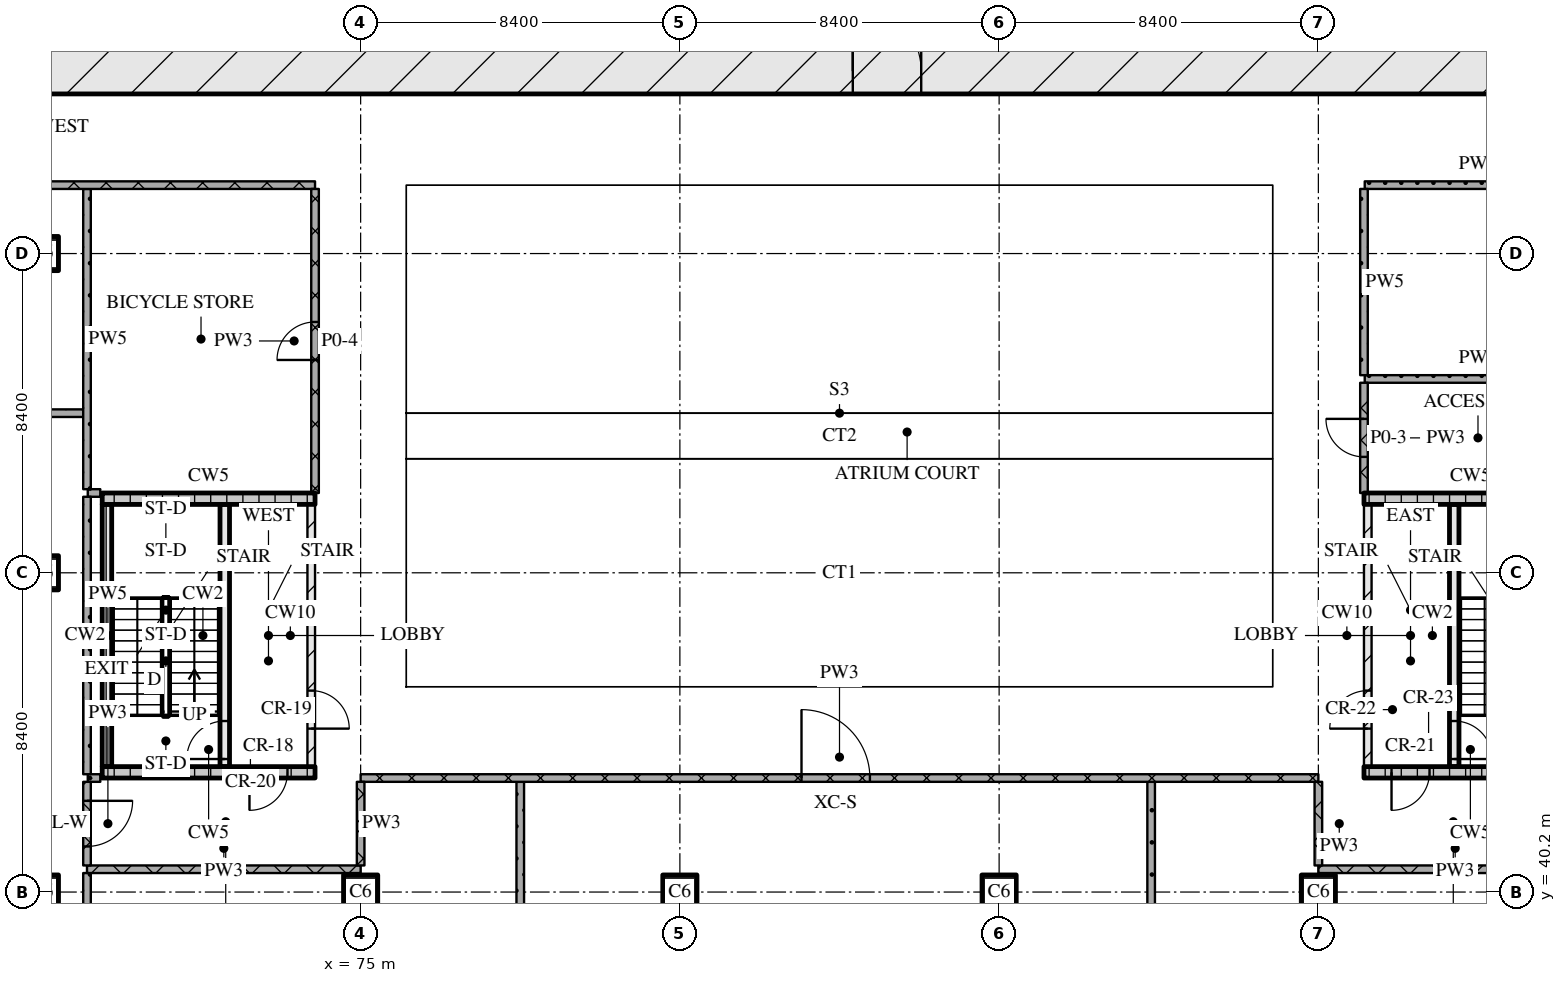
"""IFC4 building model, lengths in metres.
Left out: names, types, materials, properties, quantities, classifications, styles, units other than length and angle.
Written with IfcOpenShell. Run it as: python <this file> out.ifc"""

import sys

from ifc_helpers import new_model, si_unit, direction, frame, frame_2d, origin, origin_2d, place, context, subcontext, project, spatial, rectangle, extrude, element, fill, save


model = new_model("IFC4")
c1 = context("Model", 3, precision=1e-05, world=origin(), true_north=direction((0.0, 1.0)))
c2 = subcontext(c1, "Body", "Model", "MODEL_VIEW")
j1 = project(units=[si_unit("LENGTHUNIT", "METRE"), si_unit("PLANEANGLEUNIT", "RADIAN")], contexts=[c1])
p1 = place(None, origin())
s1 = spatial("IfcSite", under=j1, at=p1, CompositionType="ELEMENT")
p2 = place(p1, origin())
s2 = spatial("IfcBuilding", under=s1, at=p2, CompositionType="ELEMENT")
p3 = place(p2, origin())
s3 = spatial("IfcBuildingStorey", under=s2, at=p3, CompositionType="ELEMENT", Elevation=0.0)
for number, where, z_axis, x_axis in (
    (1, (66.6, 40.2, 0.0), (0.0, 0.0, 1.0), (1.0, 0.0, 0.0)),
    (2, (66.6, 48.6, 0.0), (0.0, 0.0, 1.0), (1.0, 0.0, 0.0)),
    (3, (66.6, 57.0, 0.0), (0.0, 0.0, 1.0), (1.0, 0.0, 0.0)),
    (4, (75.0, 40.2, 0.0), (0.0, 0.0, 1.0), (1.0, 0.0, 0.0)),
    (5, (83.4, 40.2, 0.0), (0.0, 0.0, 1.0), (1.0, 0.0, 0.0)),
    (6, (91.8, 40.2, 0.0), (0.0, 0.0, 1.0), (1.0, 0.0, 0.0)),
    (7, (100.2, 40.2, 0.0), (0.0, 0.0, 1.0), (1.0, 0.0, 0.0)),
):
    element("IfcColumn", number, at=place(p3, frame(where, z_axis=z_axis, x_axis=x_axis)), inside=s3, PredefinedType="COLUMN", context=c2, shape_type="SweptSolid", body=[
        extrude(rectangle(XDim=0.9, YDim=0.9, at=origin_2d()), origin(), (0.0, 0.0, 1.0), 9.0),
    ])
p4 = place(p3, frame((66.6, 61.8, 0.0), z_axis=(0.0, 0.0, 1.0), x_axis=(1.0, 0.0, 0.0)))
e8 = element("IfcWall", 8, at=p4, inside=s3, PredefinedType="SOLIDWALL", context=c2, shape_type="SweptSolid", body=[
    extrude(rectangle(XDim=42.0, YDim=1.2, at=frame_2d((21.0, 0.0))), origin(), (0.0, 0.0, 1.0), 8.7),
])
p5 = place(p4, frame((21.35, 0.0, 0.0)))
e9 = element("IfcOpeningElement", 9, at=p5, cuts=e8, PredefinedType="OPENING", context=c2, shape_type="SweptSolid", body=[
    extrude(rectangle(XDim=1.8, YDim=2.1, at=frame_2d((0.9, 1.05))), frame((0.0, 0.61, 0.0), z_axis=(0.0, -1.0, 0.0), x_axis=(1.0, 0.0, 0.0)), (0.0, 0.0, 1.0), 1.22),
])
p6 = place(p3, frame((68.2, 43.35, 0.0), z_axis=(0.0, 0.0, 1.0), x_axis=(1.0, 0.0, 0.0)))
e10 = element("IfcWall", 10, at=p6, inside=s3, PredefinedType="SOLIDWALL", context=c2, shape_type="SweptSolid", body=[
    extrude(rectangle(XDim=5.6, YDim=0.3, at=frame_2d((2.8, 0.0))), origin(), (0.0, 0.0, 1.0), 8.7),
])
p7 = place(p6, frame((3.875, 0.0, 0.0)))
e11 = element("IfcOpeningElement", 11, at=p7, cuts=e10, PredefinedType="OPENING", context=c2, shape_type="SweptSolid", body=[
    extrude(rectangle(XDim=1.0, YDim=2.1, at=frame_2d((0.5, 1.05))), frame((0.0, 0.16, 0.0), z_axis=(0.0, -1.0, 0.0), x_axis=(1.0, 0.0, 0.0)), (0.0, 0.0, 1.0), 0.32),
])
p8 = place(p3, frame((68.325, 43.5, 0.0), z_axis=(0.0, 0.0, 1.0), x_axis=(0.0, 1.0, 0.0)))
e12 = element("IfcWall", 12, at=p8, inside=s3, PredefinedType="SOLIDWALL", context=c2, shape_type="SweptSolid", body=[
    extrude(rectangle(XDim=6.9, YDim=0.25, at=frame_2d((3.45, 0.0))), origin(), (0.0, 0.0, 1.0), 8.7),
])
p9 = place(p3, frame((71.425, 43.5, 0.0), z_axis=(0.0, 0.0, 1.0), x_axis=(0.0, 1.0, 0.0)))
e13 = element("IfcWall", 13, at=p9, inside=s3, PredefinedType="SOLIDWALL", context=c2, shape_type="SweptSolid", body=[
    extrude(rectangle(XDim=6.9, YDim=0.25, at=frame_2d((3.45, 0.0))), origin(), (0.0, 0.0, 1.0), 8.7),
])
p10 = place(p9, frame((0.2, 0.0, 0.0)))
e14 = element("IfcOpeningElement", 14, at=p10, cuts=e13, PredefinedType="OPENING", context=c2, shape_type="SweptSolid", body=[
    extrude(rectangle(XDim=1.0, YDim=2.1, at=frame_2d((0.5, 1.05))), frame((0.0, 0.135, 0.0), z_axis=(0.0, -1.0, 0.0), x_axis=(1.0, 0.0, 0.0)), (0.0, 0.0, 1.0), 0.27),
])
p11 = place(p3, frame((73.7, 43.5, 0.0), z_axis=(0.0, 0.0, 1.0), x_axis=(0.0, 1.0, 0.0)))
e15 = element("IfcWall", 15, at=p11, inside=s3, PredefinedType="PARTITIONING", context=c2, shape_type="SweptSolid", body=[
    extrude(rectangle(XDim=6.9, YDim=0.2, at=frame_2d((3.45, 0.0))), origin(), (0.0, 0.0, 1.0), 8.7),
])
p12 = place(p11, frame((1.0, 0.0, 0.0)))
e16 = element("IfcOpeningElement", 16, at=p12, cuts=e15, PredefinedType="OPENING", context=c2, shape_type="SweptSolid", body=[
    extrude(rectangle(XDim=1.0, YDim=2.1, at=frame_2d((0.5, 1.05))), frame((0.0, 0.11, 0.0), z_axis=(0.0, -1.0, 0.0), x_axis=(1.0, 0.0, 0.0)), (0.0, 0.0, 1.0), 0.22),
])
p13 = place(p3, frame((68.2, 50.55, 0.0), z_axis=(0.0, 0.0, 1.0), x_axis=(1.0, 0.0, 0.0)))
e17 = element("IfcWall", 17, at=p13, inside=s3, PredefinedType="SOLIDWALL", context=c2, shape_type="SweptSolid", body=[
    extrude(rectangle(XDim=5.6, YDim=0.3, at=frame_2d((2.8, 0.0))), origin(), (0.0, 0.0, 1.0), 8.7),
])
p14 = place(p3, frame((101.4, 43.35, 0.0), z_axis=(0.0, 0.0, 1.0), x_axis=(1.0, 0.0, 0.0)))
e18 = element("IfcWall", 18, at=p14, inside=s3, PredefinedType="SOLIDWALL", context=c2, shape_type="SweptSolid", body=[
    extrude(rectangle(XDim=5.6, YDim=0.3, at=frame_2d((2.8, 0.0))), origin(), (0.0, 0.0, 1.0), 8.7),
])
p15 = place(p14, frame((0.725, 0.0, 0.0)))
e19 = element("IfcOpeningElement", 19, at=p15, cuts=e18, PredefinedType="OPENING", context=c2, shape_type="SweptSolid", body=[
    extrude(rectangle(XDim=1.0, YDim=2.1, at=frame_2d((0.5, 1.05))), frame((0.0, 0.16, 0.0), z_axis=(0.0, -1.0, 0.0), x_axis=(1.0, 0.0, 0.0)), (0.0, 0.0, 1.0), 0.32),
])
p16 = place(p3, frame((101.5, 43.5, 0.0), z_axis=(0.0, 0.0, 1.0), x_axis=(0.0, 1.0, 0.0)))
e20 = element("IfcWall", 20, at=p16, inside=s3, PredefinedType="PARTITIONING", context=c2, shape_type="SweptSolid", body=[
    extrude(rectangle(XDim=6.9, YDim=0.2, at=frame_2d((3.45, 0.0))), origin(), (0.0, 0.0, 1.0), 8.7),
])
p17 = place(p16, frame((1.0, 0.0, 0.0)))
e21 = element("IfcOpeningElement", 21, at=p17, cuts=e20, PredefinedType="OPENING", context=c2, shape_type="SweptSolid", body=[
    extrude(rectangle(XDim=1.0, YDim=2.1, at=frame_2d((0.5, 1.05))), frame((0.0, 0.11, 0.0), z_axis=(0.0, -1.0, 0.0), x_axis=(1.0, 0.0, 0.0)), (0.0, 0.0, 1.0), 0.22),
])
p18 = place(p3, frame((103.775, 43.5, 0.0), z_axis=(0.0, 0.0, 1.0), x_axis=(0.0, 1.0, 0.0)))
e22 = element("IfcWall", 22, at=p18, inside=s3, PredefinedType="SOLIDWALL", context=c2, shape_type="SweptSolid", body=[
    extrude(rectangle(XDim=6.9, YDim=0.25, at=frame_2d((3.45, 0.0))), origin(), (0.0, 0.0, 1.0), 8.7),
])
p19 = place(p18, frame((0.2, 0.0, 0.0)))
e23 = element("IfcOpeningElement", 23, at=p19, cuts=e22, PredefinedType="OPENING", context=c2, shape_type="SweptSolid", body=[
    extrude(rectangle(XDim=1.0, YDim=2.1, at=frame_2d((0.5, 1.05))), frame((0.0, 0.135, 0.0), z_axis=(0.0, -1.0, 0.0), x_axis=(1.0, 0.0, 0.0)), (0.0, 0.0, 1.0), 0.27),
])
p20 = place(p3, frame((101.4, 50.55, 0.0), z_axis=(0.0, 0.0, 1.0), x_axis=(1.0, 0.0, 0.0)))
e24 = element("IfcWall", 24, at=p20, inside=s3, PredefinedType="SOLIDWALL", context=c2, shape_type="SweptSolid", body=[
    extrude(rectangle(XDim=5.6, YDim=0.3, at=frame_2d((2.8, 0.0))), origin(), (0.0, 0.0, 1.0), 8.7),
])
for number, where, z_axis, x_axis in (
    (25, (67.8, 40.8, 0.0), (0.0, 0.0, 1.0), (1.0, 0.0, 0.0)),
    (26, (100.2, 40.8, 0.0), (0.0, 0.0, 1.0), (1.0, 0.0, 0.0)),
):
    element("IfcWall", number, at=place(p3, frame(where, z_axis=z_axis, x_axis=x_axis)), inside=s3, PredefinedType="PARTITIONING", context=c2, shape_type="SweptSolid", body=[
        extrude(rectangle(XDim=7.2, YDim=0.2, at=frame_2d((3.6, 0.0))), origin(), (0.0, 0.0, 1.0), 8.7),
    ])
p21 = place(p3, frame((75.0, 43.2, 0.0), z_axis=(0.0, 0.0, 1.0), x_axis=(1.0, 0.0, 0.0)))
e27 = element("IfcWall", 27, at=p21, inside=s3, PredefinedType="PARTITIONING", context=c2, shape_type="SweptSolid", body=[
    extrude(rectangle(XDim=25.2, YDim=0.2, at=frame_2d((12.6, 0.0))), origin(), (0.0, 0.0, 1.0), 8.7),
])
p22 = place(p21, frame((11.6, 0.0, 0.0)))
e28 = element("IfcOpeningElement", 28, at=p22, cuts=e27, PredefinedType="OPENING", context=c2, shape_type="SweptSolid", body=[
    extrude(rectangle(XDim=1.8, YDim=2.1, at=frame_2d((0.9, 1.05))), frame((0.0, 0.11, 0.0), z_axis=(0.0, -1.0, 0.0), x_axis=(1.0, 0.0, 0.0)), (0.0, 0.0, 1.0), 0.22),
])
for number, where, z_axis, x_axis in (
    (29, (67.82, 43.2, 0.0), (0.0, 0.0, 1.0), (1.0, 0.0, 0.0)),
    (30, (67.82, 50.7, 0.0), (0.0, 0.0, 1.0), (1.0, 0.0, 0.0)),
):
    element("IfcWall", number, at=place(p3, frame(where, z_axis=z_axis, x_axis=x_axis)), inside=s3, PredefinedType="PARTITIONING", context=c2, shape_type="SweptSolid", body=[
        extrude(rectangle(XDim=0.33, YDim=0.2, at=frame_2d((0.165, 0.0))), origin(), (0.0, 0.0, 1.0), 8.7),
    ])
p23 = place(p3, frame((45.5, 52.8, 0.0), z_axis=(0.0, 0.0, 1.0), x_axis=(1.0, 0.0, 0.0)))
e31 = element("IfcWall", 31, at=p23, inside=s3, PredefinedType="PARTITIONING", context=c2, shape_type="SweptSolid", body=[
    extrude(rectangle(XDim=22.2, YDim=0.2, at=frame_2d((11.1, 0.0))), origin(), (0.0, 0.0, 1.0), 8.7),
])
p24 = place(p3, frame((101.42, 53.7, 0.0), z_axis=(0.0, 0.0, 1.0), x_axis=(1.0, 0.0, 0.0)))
e32 = element("IfcWall", 32, at=p24, inside=s3, PredefinedType="PARTITIONING", context=c2, shape_type="SweptSolid", body=[
    extrude(rectangle(XDim=5.96, YDim=0.2, at=frame_2d((2.98, 0.0))), origin(), (0.0, 0.0, 1.0), 8.7),
])
p25 = place(p3, frame((73.8, 58.8, 0.0), z_axis=(0.0, 0.0, 1.0), x_axis=(-1.0, 0.0, 0.0)))
e33 = element("IfcWall", 33, at=p25, inside=s3, PredefinedType="PARTITIONING", context=c2, shape_type="SweptSolid", body=[
    extrude(rectangle(XDim=28.4, YDim=0.2, at=frame_2d((14.2, 0.0))), origin(), (0.0, 0.0, 1.0), 8.7),
])
p26 = place(p25, frame((16.6, 0.0, 0.0)))
e34 = element("IfcOpeningElement", 34, at=p26, cuts=e33, PredefinedType="OPENING", context=c2, shape_type="SweptSolid", body=[
    extrude(rectangle(XDim=1.2, YDim=2.1, at=frame_2d((0.6, 1.05))), frame((0.0, 0.11, 0.0), z_axis=(0.0, -1.0, 0.0), x_axis=(1.0, 0.0, 0.0)), (0.0, 0.0, 1.0), 0.22),
])
p27 = place(p3, frame((101.42, 58.8, 0.0), z_axis=(0.0, 0.0, 1.0), x_axis=(1.0, 0.0, 0.0)))
e35 = element("IfcWall", 35, at=p27, inside=s3, PredefinedType="PARTITIONING", context=c2, shape_type="SweptSolid", body=[
    extrude(rectangle(XDim=5.96, YDim=0.2, at=frame_2d((2.98, 0.0))), origin(), (0.0, 0.0, 1.0), 8.7),
])
p28 = place(p3, frame((67.8, 43.1, 0.0), z_axis=(0.0, 0.0, 1.0), x_axis=(0.0, -1.0, 0.0)))
e36 = element("IfcWall", 36, at=p28, inside=s3, PredefinedType="PARTITIONING", context=c2, shape_type="SweptSolid", body=[
    extrude(rectangle(XDim=2.2, YDim=0.2, at=frame_2d((1.1, 0.0))), origin(), (0.0, 0.0, 1.0), 8.7),
])
p29 = place(p28, frame((0.5, 0.0, 0.0)))
e37 = element("IfcOpeningElement", 37, at=p29, cuts=e36, PredefinedType="OPENING", context=c2, shape_type="SweptSolid", body=[
    extrude(rectangle(XDim=1.2, YDim=2.1, at=frame_2d((0.6, 1.05))), frame((0.0, 0.11, 0.0), z_axis=(0.0, -1.0, 0.0), x_axis=(1.0, 0.0, 0.0)), (0.0, 0.0, 1.0), 0.22),
])
p30 = place(p3, frame((67.8, 50.6, 0.0), z_axis=(0.0, 0.0, 1.0), x_axis=(0.0, -1.0, 0.0)))
e38 = element("IfcWall", 38, at=p30, inside=s3, PredefinedType="PARTITIONING", context=c2, shape_type="SweptSolid", body=[
    extrude(rectangle(XDim=7.3, YDim=0.2, at=frame_2d((3.65, 0.0))), origin(), (0.0, 0.0, 1.0), 8.7),
])
p31 = place(p3, frame((67.8, 40.7, 0.0), z_axis=(0.0, 0.0, 1.0), x_axis=(0.0, -1.0, 0.0)))
e39 = element("IfcWall", 39, at=p31, inside=s3, PredefinedType="PARTITIONING", context=c2, shape_type="SweptSolid", body=[
    extrude(rectangle(XDim=6.4, YDim=0.2, at=frame_2d((3.2, 0.0))), origin(), (0.0, 0.0, 1.0), 8.7),
])
p32 = place(p3, frame((67.8, 58.7, 0.0), z_axis=(0.0, 0.0, 1.0), x_axis=(0.0, -1.0, 0.0)))
e40 = element("IfcWall", 40, at=p32, inside=s3, PredefinedType="PARTITIONING", context=c2, shape_type="SweptSolid", body=[
    extrude(rectangle(XDim=7.9, YDim=0.2, at=frame_2d((3.95, 0.0))), origin(), (0.0, 0.0, 1.0), 8.7),
])
p33 = place(p3, frame((73.8, 50.7, 0.0), z_axis=(0.0, 0.0, 1.0), x_axis=(0.0, 1.0, 0.0)))
e41 = element("IfcWall", 41, at=p33, inside=s3, PredefinedType="PARTITIONING", context=c2, shape_type="SweptSolid", body=[
    extrude(rectangle(XDim=8.0, YDim=0.2, at=frame_2d((4.0, 0.0))), origin(), (0.0, 0.0, 1.0), 8.7),
])
p34 = place(p33, frame((3.5, 0.0, 0.0)))
e42 = element("IfcOpeningElement", 42, at=p34, cuts=e41, PredefinedType="OPENING", context=c2, shape_type="SweptSolid", body=[
    extrude(rectangle(XDim=1.0, YDim=2.1, at=frame_2d((0.5, 1.05))), frame((0.0, 0.11, 0.0), z_axis=(0.0, -1.0, 0.0), x_axis=(1.0, 0.0, 0.0)), (0.0, 0.0, 1.0), 0.22),
])
p35 = place(p3, frame((75.0, 43.1, 0.0), z_axis=(0.0, 0.0, 1.0), x_axis=(0.0, -1.0, 0.0)))
e43 = element("IfcWall", 43, at=p35, inside=s3, PredefinedType="PARTITIONING", context=c2, shape_type="SweptSolid", body=[
    extrude(rectangle(XDim=2.2, YDim=0.2, at=frame_2d((1.1, 0.0))), origin(), (0.0, 0.0, 1.0), 7.8),
])
for number, where, z_axis, x_axis in (
    (44, (79.2, 43.1, 0.0), (0.0, 0.0, 1.0), (0.0, -1.0, 0.0)),
    (45, (95.8, 43.1, 0.0), (0.0, 0.0, 1.0), (0.0, -1.0, 0.0)),
):
    element("IfcWall", number, at=place(p3, frame(where, z_axis=z_axis, x_axis=x_axis)), inside=s3, PredefinedType="PARTITIONING", context=c2, shape_type="SweptSolid", body=[
        extrude(rectangle(XDim=8.8, YDim=0.2, at=frame_2d((4.4, 0.0))), origin(), (0.0, 0.0, 1.0), 8.7),
    ])
p36 = place(p3, frame((100.2, 43.1, 0.0), z_axis=(0.0, 0.0, 1.0), x_axis=(0.0, -1.0, 0.0)))
e46 = element("IfcWall", 46, at=p36, inside=s3, PredefinedType="PARTITIONING", context=c2, shape_type="SweptSolid", body=[
    extrude(rectangle(XDim=2.2, YDim=0.2, at=frame_2d((1.1, 0.0))), origin(), (0.0, 0.0, 1.0), 7.8),
])
p37 = place(p3, frame((101.4, 53.6, 0.0), z_axis=(0.0, 0.0, 1.0), x_axis=(0.0, -1.0, 0.0)))
e47 = element("IfcWall", 47, at=p37, inside=s3, PredefinedType="PARTITIONING", context=c2, shape_type="SweptSolid", body=[
    extrude(rectangle(XDim=2.9, YDim=0.2, at=frame_2d((1.45, 0.0))), origin(), (0.0, 0.0, 1.0), 8.7),
])
p38 = place(p37, frame((0.95, 0.0, 0.0)))
e48 = element("IfcOpeningElement", 48, at=p38, cuts=e47, PredefinedType="OPENING", context=c2, shape_type="SweptSolid", body=[
    extrude(rectangle(XDim=1.0, YDim=2.1, at=frame_2d((0.5, 1.05))), frame((0.0, 0.11, 0.0), z_axis=(0.0, -1.0, 0.0), x_axis=(1.0, 0.0, 0.0)), (0.0, 0.0, 1.0), 0.22),
])
p39 = place(p3, frame((101.4, 58.7, 0.0), z_axis=(0.0, 0.0, 1.0), x_axis=(0.0, -1.0, 0.0)))
e49 = element("IfcWall", 49, at=p39, inside=s3, PredefinedType="PARTITIONING", context=c2, shape_type="SweptSolid", body=[
    extrude(rectangle(XDim=4.9, YDim=0.2, at=frame_2d((2.45, 0.0))), origin(), (0.0, 0.0, 1.0), 8.7),
])
p40 = place(p5, origin())
e50 = element("IfcDoor", 50, at=p40, inside=s3, OperationType="DOUBLE_DOOR_SINGLE_SWING", PredefinedType="DOOR", context=c2, shape_type="SweptSolid", body=[
    extrude(rectangle(XDim=1.8, YDim=2.1, at=frame_2d((0.9, 1.05))), frame((0.0, 0.025, 0.0), z_axis=(0.0, -1.0, 0.0), x_axis=(1.0, 0.0, 0.0)), (0.0, 0.0, 1.0), 0.05),
])
fill(e9, e50)
p41 = place(p7, origin())
e51 = element("IfcDoor", 51, at=p41, inside=s3, OperationType="SINGLE_SWING_RIGHT", PredefinedType="DOOR", context=c2, shape_type="SweptSolid", body=[
    extrude(rectangle(XDim=1.0, YDim=2.1, at=frame_2d((0.5, 1.05))), frame((0.0, 0.025, 0.0), z_axis=(0.0, -1.0, 0.0), x_axis=(1.0, 0.0, 0.0)), (0.0, 0.0, 1.0), 0.05),
])
fill(e11, e51)
p42 = place(p10, origin())
e52 = element("IfcDoor", 52, at=p42, inside=s3, OperationType="SINGLE_SWING_LEFT", PredefinedType="DOOR", context=c2, shape_type="SweptSolid", body=[
    extrude(rectangle(XDim=1.0, YDim=2.1, at=frame_2d((0.5, 1.05))), frame((0.0, 0.025, 0.0), z_axis=(0.0, -1.0, 0.0), x_axis=(1.0, 0.0, 0.0)), (0.0, 0.0, 1.0), 0.05),
])
fill(e14, e52)
p43 = place(p12, origin())
e53 = element("IfcDoor", 53, at=p43, inside=s3, OperationType="SINGLE_SWING_RIGHT", PredefinedType="DOOR", context=c2, shape_type="SweptSolid", body=[
    extrude(rectangle(XDim=1.0, YDim=2.1, at=frame_2d((0.5, 1.05))), frame((0.0, 0.025, 0.0), z_axis=(0.0, -1.0, 0.0), x_axis=(1.0, 0.0, 0.0)), (0.0, 0.0, 1.0), 0.05),
])
fill(e16, e53)
p44 = place(p15, origin())
e54 = element("IfcDoor", 54, at=p44, inside=s3, OperationType="SINGLE_SWING_RIGHT", PredefinedType="DOOR", context=c2, shape_type="SweptSolid", body=[
    extrude(rectangle(XDim=1.0, YDim=2.1, at=frame_2d((0.5, 1.05))), frame((0.0, 0.025, 0.0), z_axis=(0.0, -1.0, 0.0), x_axis=(1.0, 0.0, 0.0)), (0.0, 0.0, 1.0), 0.05),
])
fill(e19, e54)
p45 = place(p19, origin())
e55 = element("IfcDoor", 55, at=p45, inside=s3, OperationType="SINGLE_SWING_RIGHT", PredefinedType="DOOR", context=c2, shape_type="SweptSolid", body=[
    extrude(rectangle(XDim=1.0, YDim=2.1, at=frame_2d((0.5, 1.05))), frame((0.0, 0.025, 0.0), z_axis=(0.0, -1.0, 0.0), x_axis=(1.0, 0.0, 0.0)), (0.0, 0.0, 1.0), 0.05),
])
fill(e23, e55)
p46 = place(p17, origin())
e56 = element("IfcDoor", 56, at=p46, inside=s3, OperationType="SINGLE_SWING_LEFT", PredefinedType="DOOR", context=c2, shape_type="SweptSolid", body=[
    extrude(rectangle(XDim=1.0, YDim=2.1, at=frame_2d((0.5, 1.05))), frame((0.0, 0.025, 0.0), z_axis=(0.0, -1.0, 0.0), x_axis=(1.0, 0.0, 0.0)), (0.0, 0.0, 1.0), 0.05),
])
fill(e21, e56)
p47 = place(p34, origin())
e57 = element("IfcDoor", 57, at=p47, inside=s3, OperationType="SINGLE_SWING_LEFT", PredefinedType="DOOR", context=c2, shape_type="SweptSolid", body=[
    extrude(rectangle(XDim=1.0, YDim=2.1, at=frame_2d((0.5, 1.05))), frame((0.0, 0.025, 0.0), z_axis=(0.0, -1.0, 0.0), x_axis=(1.0, 0.0, 0.0)), (0.0, 0.0, 1.0), 0.05),
])
fill(e42, e57)
p48 = place(p38, origin())
e58 = element("IfcDoor", 58, at=p48, inside=s3, OperationType="SINGLE_SWING_RIGHT", PredefinedType="DOOR", context=c2, shape_type="SweptSolid", body=[
    extrude(rectangle(XDim=1.0, YDim=2.1, at=frame_2d((0.5, 1.05))), frame((0.0, 0.025, 0.0), z_axis=(0.0, -1.0, 0.0), x_axis=(1.0, 0.0, 0.0)), (0.0, 0.0, 1.0), 0.05),
])
fill(e48, e58)
p49 = place(p29, origin())
e59 = element("IfcDoor", 59, at=p49, inside=s3, OperationType="SINGLE_SWING_LEFT", PredefinedType="DOOR", context=c2, shape_type="SweptSolid", body=[
    extrude(rectangle(XDim=1.2, YDim=2.1, at=frame_2d((0.6, 1.05))), frame((0.0, 0.025, 0.0), z_axis=(0.0, -1.0, 0.0), x_axis=(1.0, 0.0, 0.0)), (0.0, 0.0, 1.0), 0.05),
])
fill(e37, e59)
p50 = place(p22, origin())
e60 = element("IfcDoor", 60, at=p50, inside=s3, OperationType="DOUBLE_DOOR_SINGLE_SWING", PredefinedType="DOOR", context=c2, shape_type="SweptSolid", body=[
    extrude(rectangle(XDim=1.8, YDim=2.1, at=frame_2d((0.9, 1.05))), frame((0.0, 0.025, 0.0), z_axis=(0.0, -1.0, 0.0), x_axis=(1.0, 0.0, 0.0)), (0.0, 0.0, 1.0), 0.05),
])
fill(e28, e60)
save(model, sys.argv[1])
